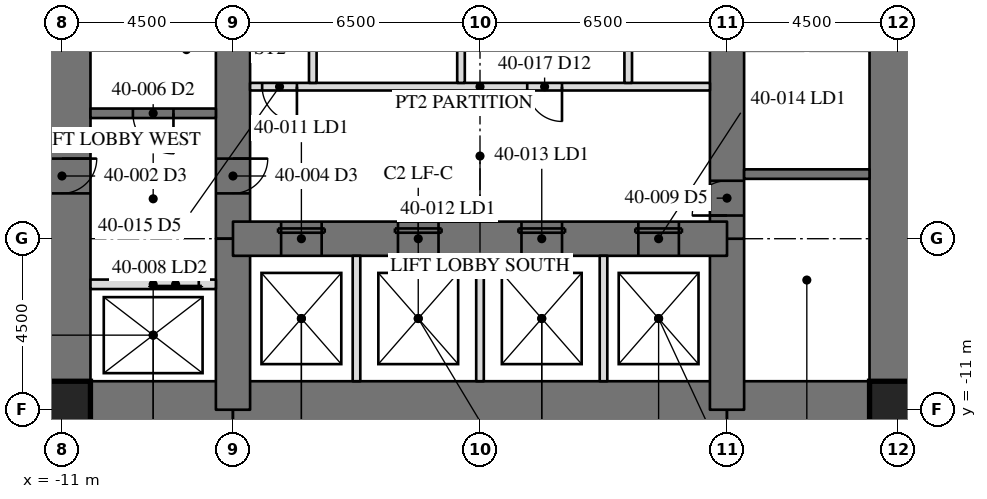
"""IFC4 building model, lengths in metres.
Left out: names, types, materials, properties, quantities, classifications, styles, units other than length and angle.
Written with IfcOpenShell. Run it as: python <this file> out.ifc"""

import sys

from ifc_helpers import new_model, si_unit, direction, frame, frame_2d, origin, origin_2d, place, context, subcontext, project, spatial, rectangle, hollow_rectangle, extrude, element, fill, save


model = new_model("IFC4")
c1 = context("Model", 3, precision=1e-05, world=origin(), true_north=direction((0.0, 1.0)))
c2 = subcontext(c1, "Body", "Model", "MODEL_VIEW")
j1 = project(units=[si_unit("LENGTHUNIT", "METRE"), si_unit("PLANEANGLEUNIT", "RADIAN")], contexts=[c1])
p1 = place(None, origin())
s1 = spatial("IfcSite", under=j1, at=p1, CompositionType="ELEMENT")
p2 = place(p1, origin())
s2 = spatial("IfcBuilding", under=s1, at=p2, CompositionType="ELEMENT")
p3 = place(p2, frame((0.0, 0.0, 170.5)))
s3 = spatial("IfcBuildingStorey", under=s2, at=p3, CompositionType="ELEMENT", Elevation=170.5)
p4 = place(p3, frame((11.0, -11.0, 0.0), z_axis=(0.0, 0.0, 1.0), x_axis=(0.0, 1.0, 0.0)))
e1 = element("IfcWall", 1, at=p4, inside=s3, PredefinedType="SHEAR", context=c2, shape_type="SweptSolid", body=[
    extrude(rectangle(XDim=22.0, YDim=1.5, at=frame_2d((11.0, 0.0))), origin(), (0.0, 0.0, 1.0), 4.1),
])
p5 = place(p4, frame((15.393, 0.0, 0.0)))
e2 = element("IfcOpeningElement", 2, at=p5, cuts=e1, PredefinedType="OPENING", context=c2, shape_type="SweptSolid", body=[
    extrude(rectangle(XDim=0.915, YDim=2.134, at=frame_2d((0.458, 1.067))), frame((0.0, 0.76, 0.0), z_axis=(0.0, -1.0, 0.0), x_axis=(1.0, 0.0, 0.0)), (0.0, 0.0, 1.0), 1.52),
])
p6 = place(p3, frame((-11.0, 11.0, 0.0), z_axis=(0.0, 0.0, 1.0), x_axis=(0.0, -1.0, 0.0)))
e3 = element("IfcWall", 3, at=p6, inside=s3, PredefinedType="SHEAR", context=c2, shape_type="SweptSolid", body=[
    extrude(rectangle(XDim=22.0, YDim=1.5, at=frame_2d((11.0, 0.0))), origin(), (0.0, 0.0, 1.0), 4.1),
])
p7 = place(p6, frame((15.393, 0.0, 0.0)))
e4 = element("IfcOpeningElement", 4, at=p7, cuts=e3, PredefinedType="OPENING", context=c2, shape_type="SweptSolid", body=[
    extrude(rectangle(XDim=0.915, YDim=2.134, at=frame_2d((0.458, 1.067))), frame((0.0, 0.76, 0.0), z_axis=(0.0, -1.0, 0.0), x_axis=(1.0, 0.0, 0.0)), (0.0, 0.0, 1.0), 1.52),
])
p8 = place(p3, frame((-11.0, -11.0, 0.0), z_axis=(0.0, 0.0, 1.0), x_axis=(1.0, 0.0, 0.0)))
e5 = element("IfcWall", 5, at=p8, inside=s3, PredefinedType="SHEAR", context=c2, shape_type="SweptSolid", body=[
    extrude(rectangle(XDim=4.5, YDim=1.5, at=frame_2d((2.25, 0.0))), origin(), (0.0, 0.0, 1.0), 4.1),
])
p9 = place(p3, frame((-6.5, -11.0, 0.0), z_axis=(0.0, 0.0, 1.0), x_axis=(1.0, 0.0, 0.0)))
e6 = element("IfcWall", 6, at=p9, inside=s3, PredefinedType="SHEAR", context=c2, shape_type="SweptSolid", body=[
    extrude(rectangle(XDim=13.0, YDim=1.5, at=frame_2d((6.5, 0.0))), origin(), (0.0, 0.0, 1.0), 4.1),
])
p10 = place(p3, frame((6.5, -11.0, 0.0), z_axis=(0.0, 0.0, 1.0), x_axis=(1.0, 0.0, 0.0)))
e7 = element("IfcWall", 7, at=p10, inside=s3, PredefinedType="SHEAR", context=c2, shape_type="SweptSolid", body=[
    extrude(rectangle(XDim=4.5, YDim=1.5, at=frame_2d((2.25, 0.0))), origin(), (0.0, 0.0, 1.0), 4.1),
])
p11 = place(p3, frame((6.5, -11.0, 0.0), z_axis=(0.0, 0.0, 1.0), x_axis=(0.0, 1.0, 0.0)))
e8 = element("IfcWall", 8, at=p11, inside=s3, PredefinedType="SHEAR", context=c2, shape_type="SweptSolid", body=[
    extrude(rectangle(XDim=4.5, YDim=0.9, at=frame_2d((2.25, 0.0))), origin(), (0.0, 0.0, 1.0), 4.1),
])
p12 = place(p3, frame((6.5, -6.5, 0.0), z_axis=(0.0, 0.0, 1.0), x_axis=(0.0, 1.0, 0.0)))
e9 = element("IfcWall", 9, at=p12, inside=s3, PredefinedType="SHEAR", context=c2, shape_type="SweptSolid", body=[
    extrude(rectangle(XDim=13.0, YDim=0.9, at=frame_2d((6.5, 0.0))), origin(), (0.0, 0.0, 1.0), 4.1),
])
p13 = place(p12, frame((10.893, 0.0, 0.0)))
e10 = element("IfcOpeningElement", 10, at=p13, cuts=e9, PredefinedType="OPENING", context=c2, shape_type="SweptSolid", body=[
    extrude(rectangle(XDim=0.915, YDim=2.134, at=frame_2d((0.458, 1.067))), frame((0.0, 0.46, 0.0), z_axis=(0.0, -1.0, 0.0), x_axis=(1.0, 0.0, 0.0)), (0.0, 0.0, 1.0), 0.92),
])
p14 = place(p12, frame((0.61, 0.0, 0.0)))
e11 = element("IfcOpeningElement", 11, at=p14, cuts=e9, PredefinedType="OPENING", context=c2, shape_type="SweptSolid", body=[
    extrude(rectangle(XDim=0.915, YDim=2.134, at=frame_2d((0.458, 1.067))), frame((0.0, 0.46, 0.0), z_axis=(0.0, -1.0, 0.0), x_axis=(1.0, 0.0, 0.0)), (0.0, 0.0, 1.0), 0.92),
])
p15 = place(p3, frame((-6.5, 6.5, 0.0), z_axis=(0.0, 0.0, 1.0), x_axis=(0.0, -1.0, 0.0)))
e12 = element("IfcWall", 12, at=p15, inside=s3, PredefinedType="SHEAR", context=c2, shape_type="SweptSolid", body=[
    extrude(rectangle(XDim=13.0, YDim=0.9, at=frame_2d((6.5, 0.0))), origin(), (0.0, 0.0, 1.0), 4.1),
])
p16 = place(p15, frame((10.893, 0.0, 0.0)))
e13 = element("IfcOpeningElement", 13, at=p16, cuts=e12, PredefinedType="OPENING", context=c2, shape_type="SweptSolid", body=[
    extrude(rectangle(XDim=0.915, YDim=2.134, at=frame_2d((0.458, 1.067))), frame((0.0, 0.46, 0.0), z_axis=(0.0, -1.0, 0.0), x_axis=(1.0, 0.0, 0.0)), (0.0, 0.0, 1.0), 0.92),
])
p17 = place(p15, frame((0.61, 0.0, 0.0)))
e14 = element("IfcOpeningElement", 14, at=p17, cuts=e12, PredefinedType="OPENING", context=c2, shape_type="SweptSolid", body=[
    extrude(rectangle(XDim=0.915, YDim=2.134, at=frame_2d((0.458, 1.067))), frame((0.0, 0.46, 0.0), z_axis=(0.0, -1.0, 0.0), x_axis=(1.0, 0.0, 0.0)), (0.0, 0.0, 1.0), 0.92),
])
p18 = place(p3, frame((-6.5, -6.5, 0.0), z_axis=(0.0, 0.0, 1.0), x_axis=(0.0, -1.0, 0.0)))
e15 = element("IfcWall", 15, at=p18, inside=s3, PredefinedType="SHEAR", context=c2, shape_type="SweptSolid", body=[
    extrude(rectangle(XDim=4.5, YDim=0.9, at=frame_2d((2.25, 0.0))), origin(), (0.0, 0.0, 1.0), 4.1),
])
p19 = place(p3, frame((-6.5, -6.5, 0.0), z_axis=(0.0, 0.0, 1.0), x_axis=(1.0, 0.0, 0.0)))
e16 = element("IfcWall", 16, at=p19, inside=s3, PredefinedType="SHEAR", context=c2, shape_type="SweptSolid", body=[
    extrude(rectangle(XDim=13.0, YDim=0.9, at=frame_2d((6.5, 0.0))), origin(), (0.0, 0.0, 1.0), 4.1),
])
p20 = place(p19, frame((1.267, 0.0, 0.0)))
e17 = element("IfcOpeningElement", 17, at=p20, cuts=e16, PredefinedType="OPENING", context=c2, shape_type="SweptSolid", body=[
    extrude(rectangle(XDim=1.067, YDim=2.134, at=frame_2d((0.533, 1.067))), frame((0.0, 0.46, 0.0), z_axis=(0.0, -1.0, 0.0), x_axis=(1.0, 0.0, 0.0)), (0.0, 0.0, 1.0), 0.92),
])
p21 = place(p19, frame((4.342, 0.0, 0.0)))
e18 = element("IfcOpeningElement", 18, at=p21, cuts=e16, PredefinedType="OPENING", context=c2, shape_type="SweptSolid", body=[
    extrude(rectangle(XDim=1.067, YDim=2.134, at=frame_2d((0.533, 1.067))), frame((0.0, 0.46, 0.0), z_axis=(0.0, -1.0, 0.0), x_axis=(1.0, 0.0, 0.0)), (0.0, 0.0, 1.0), 0.92),
])
p22 = place(p19, frame((7.592, 0.0, 0.0)))
e19 = element("IfcOpeningElement", 19, at=p22, cuts=e16, PredefinedType="OPENING", context=c2, shape_type="SweptSolid", body=[
    extrude(rectangle(XDim=1.067, YDim=2.134, at=frame_2d((0.533, 1.067))), frame((0.0, 0.46, 0.0), z_axis=(0.0, -1.0, 0.0), x_axis=(1.0, 0.0, 0.0)), (0.0, 0.0, 1.0), 0.92),
])
p23 = place(p19, frame((10.667, 0.0, 0.0)))
e20 = element("IfcOpeningElement", 20, at=p23, cuts=e16, PredefinedType="OPENING", context=c2, shape_type="SweptSolid", body=[
    extrude(rectangle(XDim=1.067, YDim=2.134, at=frame_2d((0.533, 1.067))), frame((0.0, 0.46, 0.0), z_axis=(0.0, -1.0, 0.0), x_axis=(1.0, 0.0, 0.0)), (0.0, 0.0, 1.0), 0.92),
])
for number, where, z_axis, x_axis in (
    (21, (-11.0, -11.0, 0.0), (0.0, 0.0, 1.0), (1.0, 0.0, 0.0)),
    (22, (11.0, -11.0, 0.0), (0.0, 0.0, 1.0), (1.0, 0.0, 0.0)),
):
    element("IfcColumn", number, at=place(p3, frame(where, z_axis=z_axis, x_axis=x_axis)), inside=s3, PredefinedType="COLUMN", context=c2, shape_type="SweptSolid", body=[
        extrude(hollow_rectangle(XDim=1.499, YDim=1.499, WallThickness=0.102, at=origin_2d()), origin(), (0.0, 0.0, 1.0), 4.1),
    ])
p24 = place(p3, frame((6.95, -4.8, 0.0), z_axis=(0.0, 0.0, 1.0), x_axis=(1.0, 0.0, 0.0)))
e23 = element("IfcWall", 23, at=p24, inside=s3, PredefinedType="SOLIDWALL", context=c2, shape_type="SweptSolid", body=[
    extrude(rectangle(XDim=3.3, YDim=0.25, at=frame_2d((1.65, 0.0))), origin(), (0.0, 0.0, 1.0), 3.91),
])
p25 = place(p3, frame((-6.95, -3.2, 0.0), z_axis=(0.0, 0.0, 1.0), x_axis=(-1.0, 0.0, 0.0)))
e24 = element("IfcWall", 24, at=p25, inside=s3, PredefinedType="SOLIDWALL", context=c2, shape_type="SweptSolid", body=[
    extrude(rectangle(XDim=3.3, YDim=0.25, at=frame_2d((1.65, 0.0))), origin(), (0.0, 0.0, 1.0), 3.91),
])
p26 = place(p25, frame((1.116, 0.0, 0.0)))
e25 = element("IfcOpeningElement", 25, at=p26, cuts=e24, PredefinedType="OPENING", context=c2, shape_type="SweptSolid", body=[
    extrude(rectangle(XDim=1.067, YDim=2.134, at=frame_2d((0.533, 1.067))), frame((0.0, 0.135, 0.0), z_axis=(0.0, -1.0, 0.0), x_axis=(1.0, 0.0, 0.0)), (0.0, 0.0, 1.0), 0.27),
])
p27 = place(p3, frame((-6.95, -7.7, 0.0), z_axis=(0.0, 0.0, 1.0), x_axis=(-1.0, 0.0, 0.0)))
e26 = element("IfcWall", 26, at=p27, inside=s3, PredefinedType="PARTITIONING", context=c2, shape_type="SweptSolid", body=[
    extrude(rectangle(XDim=3.3, YDim=0.25, at=frame_2d((1.65, 0.0))), origin(), (0.0, 0.0, 1.0), 3.91),
])
p28 = place(p27, frame((0.45, 0.0, 0.0)))
e27 = element("IfcOpeningElement", 27, at=p28, cuts=e26, PredefinedType="OPENING", context=c2, shape_type="SweptSolid", body=[
    extrude(rectangle(XDim=1.219, YDim=2.134, at=frame_2d((0.609, 1.067))), frame((0.0, 0.135, 0.0), z_axis=(0.0, -1.0, 0.0), x_axis=(1.0, 0.0, 0.0)), (0.0, 0.0, 1.0), 0.27),
])
p29 = place(p3, frame((6.05, -2.5, 0.0), z_axis=(0.0, 0.0, 1.0), x_axis=(-1.0, 0.0, 0.0)))
e28 = element("IfcWall", 28, at=p29, inside=s3, PredefinedType="PARTITIONING", context=c2, shape_type="SweptSolid", body=[
    extrude(rectangle(XDim=12.1, YDim=0.2, at=frame_2d((6.05, 0.0))), origin(), (0.0, 0.0, 1.0), 3.91),
])
p30 = place(p29, frame((10.867, 0.0, 0.0)))
e29 = element("IfcOpeningElement", 29, at=p30, cuts=e28, PredefinedType="OPENING", context=c2, shape_type="SweptSolid", body=[
    extrude(rectangle(XDim=0.915, YDim=2.134, at=frame_2d((0.458, 1.067))), frame((0.0, 0.11, 0.0), z_axis=(0.0, -1.0, 0.0), x_axis=(1.0, 0.0, 0.0)), (0.0, 0.0, 1.0), 0.22),
])
p31 = place(p29, frame((3.893, 0.0, 0.0)))
e30 = element("IfcOpeningElement", 30, at=p31, cuts=e28, PredefinedType="OPENING", context=c2, shape_type="SweptSolid", body=[
    extrude(rectangle(XDim=0.915, YDim=2.134, at=frame_2d((0.458, 1.067))), frame((0.0, 0.11, 0.0), z_axis=(0.0, -1.0, 0.0), x_axis=(1.0, 0.0, 0.0)), (0.0, 0.0, 1.0), 0.22),
])
for number, where, z_axis, x_axis in (
    (31, (-3.25, -10.25, 0.0), (0.0, 0.0, 1.0), (0.0, 1.0, 0.0)),
    (32, (0.0, -10.25, 0.0), (0.0, 0.0, 1.0), (0.0, 1.0, 0.0)),
    (33, (3.25, -10.25, 0.0), (0.0, 0.0, 1.0), (0.0, 1.0, 0.0)),
):
    element("IfcWall", number, at=place(p3, frame(where, z_axis=z_axis, x_axis=x_axis)), inside=s3, PredefinedType="PARTITIONING", context=c2, shape_type="SweptSolid", body=[
        extrude(rectangle(XDim=3.3, YDim=0.2, at=frame_2d((1.65, 0.0))), origin(), (0.0, 0.0, 1.0), 3.91),
    ])
for number, where, z_axis, x_axis in (
    (34, (-4.4, -2.4, 0.0), (0.0, 0.0, 1.0), (0.0, 1.0, 0.0)),
    (35, (-0.5, -2.4, 0.0), (0.0, 0.0, 1.0), (0.0, 1.0, 0.0)),
    (36, (3.9, -2.4, 0.0), (0.0, 0.0, 1.0), (0.0, 1.0, 0.0)),
):
    element("IfcWall", number, at=place(p3, frame(where, z_axis=z_axis, x_axis=x_axis)), inside=s3, PredefinedType="PARTITIONING", context=c2, shape_type="SweptSolid", body=[
        extrude(rectangle(XDim=4.8, YDim=0.2, at=frame_2d((2.4, 0.0))), origin(), (0.0, 0.0, 1.0), 3.91),
    ])
p32 = place(p16, origin())
e37 = element("IfcDoor", 37, at=p32, inside=s3, OperationType="SINGLE_SWING_RIGHT", PredefinedType="DOOR", context=c2, shape_type="SweptSolid", body=[
    extrude(rectangle(XDim=0.915, YDim=2.134, at=frame_2d((0.458, 1.067))), frame((0.0, -0.375, 0.0), z_axis=(0.0, -1.0, 0.0), x_axis=(1.0, 0.0, 0.0)), (0.0, 0.0, 1.0), 0.05),
])
fill(e13, e37)
p33 = place(p26, origin())
e38 = element("IfcDoor", 38, at=p33, inside=s3, OperationType="SINGLE_SWING_LEFT", PredefinedType="DOOR", context=c2, shape_type="SweptSolid", body=[
    extrude(rectangle(XDim=1.067, YDim=2.134, at=frame_2d((0.533, 1.067))), frame((0.0, 0.025, 0.0), z_axis=(0.0, -1.0, 0.0), x_axis=(1.0, 0.0, 0.0)), (0.0, 0.0, 1.0), 0.05),
])
fill(e25, e38)
p34 = place(p28, origin())
e39 = element("IfcDoor", 39, at=p34, inside=s3, OperationType="SLIDING_TO_LEFT", PredefinedType="DOOR", context=c2, shape_type="SweptSolid", body=[
    extrude(rectangle(XDim=1.219, YDim=2.134, at=frame_2d((0.609, 1.067))), frame((0.0, 0.025, 0.0), z_axis=(0.0, -1.0, 0.0), x_axis=(1.0, 0.0, 0.0)), (0.0, 0.0, 1.0), 0.05),
])
fill(e27, e39)
p35 = place(p14, origin())
e40 = element("IfcDoor", 40, at=p35, inside=s3, OperationType="SINGLE_SWING_RIGHT", PredefinedType="DOOR", context=c2, shape_type="SweptSolid", body=[
    extrude(rectangle(XDim=0.915, YDim=2.134, at=frame_2d((0.458, 1.067))), frame((0.0, -0.375, 0.0), z_axis=(0.0, -1.0, 0.0), x_axis=(1.0, 0.0, 0.0)), (0.0, 0.0, 1.0), 0.05),
])
fill(e11, e40)
p36 = place(p20, origin())
e41 = element("IfcDoor", 41, at=p36, inside=s3, OperationType="SLIDING_TO_LEFT", PredefinedType="DOOR", context=c2, shape_type="SweptSolid", body=[
    extrude(rectangle(XDim=1.067, YDim=2.134, at=frame_2d((0.533, 1.067))), frame((0.0, -0.375, 0.0), z_axis=(0.0, -1.0, 0.0), x_axis=(1.0, 0.0, 0.0)), (0.0, 0.0, 1.0), 0.05),
])
fill(e17, e41)
p37 = place(p21, origin())
e42 = element("IfcDoor", 42, at=p37, inside=s3, OperationType="SLIDING_TO_LEFT", PredefinedType="DOOR", context=c2, shape_type="SweptSolid", body=[
    extrude(rectangle(XDim=1.067, YDim=2.134, at=frame_2d((0.533, 1.067))), frame((0.0, -0.375, 0.0), z_axis=(0.0, -1.0, 0.0), x_axis=(1.0, 0.0, 0.0)), (0.0, 0.0, 1.0), 0.05),
])
fill(e18, e42)
p38 = place(p22, origin())
e43 = element("IfcDoor", 43, at=p38, inside=s3, OperationType="SLIDING_TO_LEFT", PredefinedType="DOOR", context=c2, shape_type="SweptSolid", body=[
    extrude(rectangle(XDim=1.067, YDim=2.134, at=frame_2d((0.533, 1.067))), frame((0.0, -0.375, 0.0), z_axis=(0.0, -1.0, 0.0), x_axis=(1.0, 0.0, 0.0)), (0.0, 0.0, 1.0), 0.05),
])
fill(e19, e43)
p39 = place(p23, origin())
e44 = element("IfcDoor", 44, at=p39, inside=s3, OperationType="SLIDING_TO_LEFT", PredefinedType="DOOR", context=c2, shape_type="SweptSolid", body=[
    extrude(rectangle(XDim=1.067, YDim=2.134, at=frame_2d((0.533, 1.067))), frame((0.0, -0.375, 0.0), z_axis=(0.0, -1.0, 0.0), x_axis=(1.0, 0.0, 0.0)), (0.0, 0.0, 1.0), 0.05),
])
fill(e20, e44)
p40 = place(p30, origin())
e45 = element("IfcDoor", 45, at=p40, inside=s3, OperationType="SINGLE_SWING_RIGHT", PredefinedType="DOOR", context=c2, shape_type="SweptSolid", body=[
    extrude(rectangle(XDim=0.915, YDim=2.134, at=frame_2d((0.458, 1.067))), frame((0.0, 0.025, 0.0), z_axis=(0.0, -1.0, 0.0), x_axis=(1.0, 0.0, 0.0)), (0.0, 0.0, 1.0), 0.05),
])
fill(e29, e45)
p41 = place(p31, origin())
e46 = element("IfcDoor", 46, at=p41, inside=s3, OperationType="SINGLE_SWING_LEFT", PredefinedType="DOOR", context=c2, shape_type="SweptSolid", body=[
    extrude(rectangle(XDim=0.915, YDim=2.134, at=frame_2d((0.458, 1.067))), frame((0.0, 0.025, 0.0), z_axis=(0.0, -1.0, 0.0), x_axis=(1.0, 0.0, 0.0)), (0.0, 0.0, 1.0), 0.05),
])
fill(e30, e46)
save(model, sys.argv[1])
